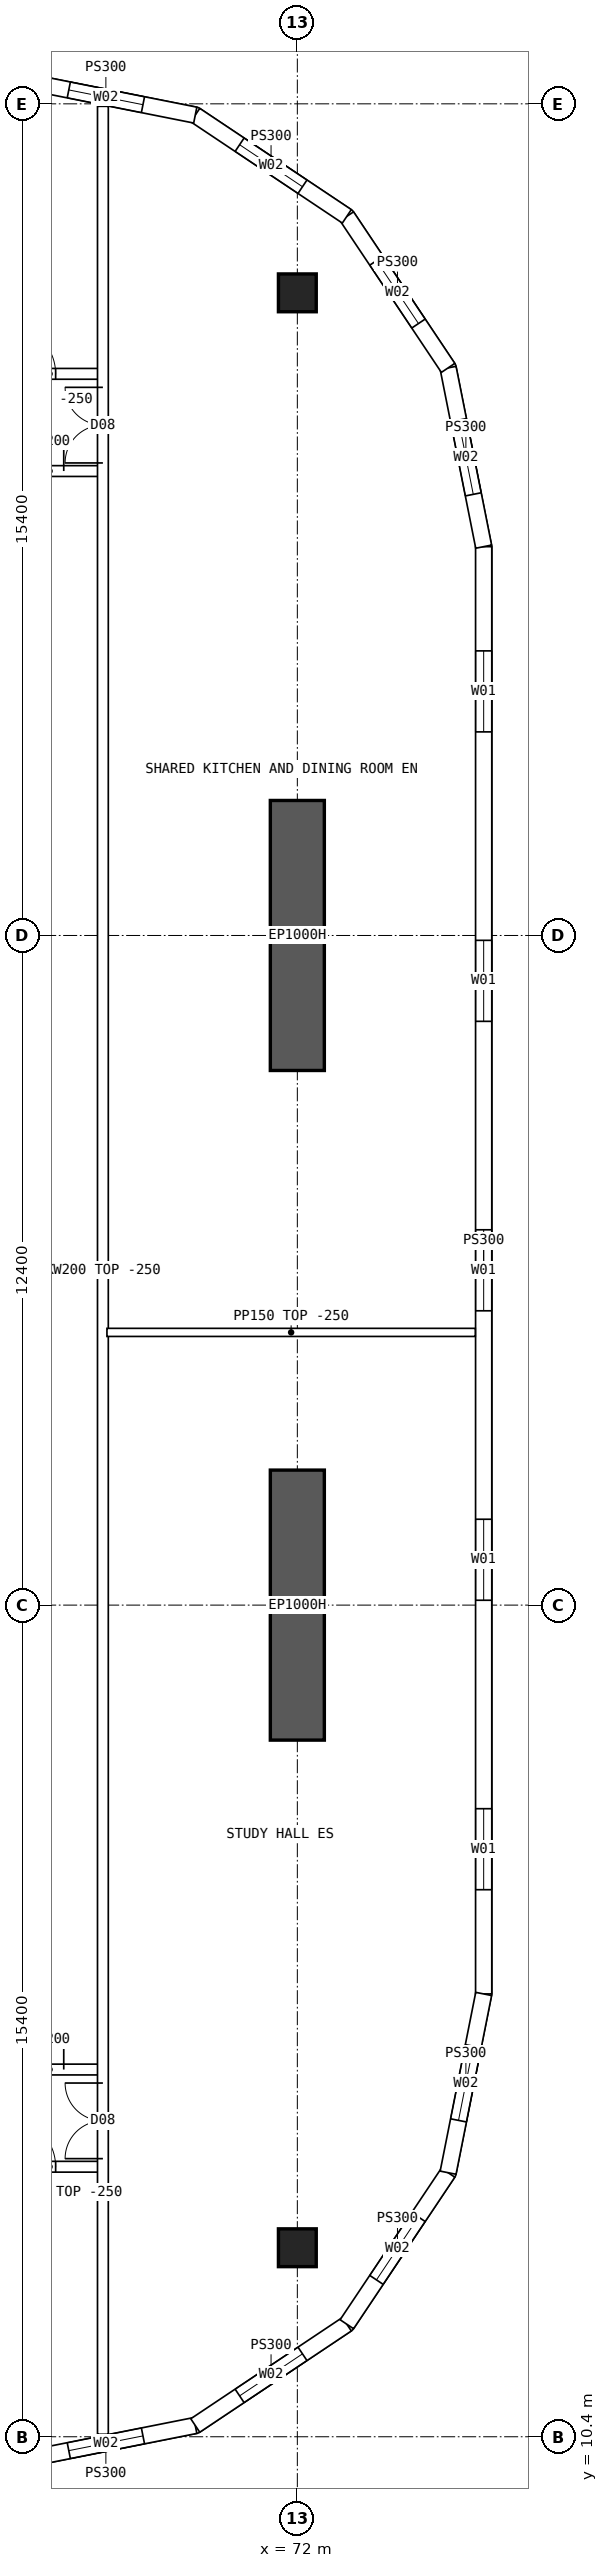
"""IFC4 building model, lengths in metres.
Left out: names, types, materials, properties, quantities, classifications, styles, units other than length and angle.
Written with IfcOpenShell. Run it as: python <this file> out.ifc"""

import sys

from ifc_helpers import new_model, si_unit, direction, frame, frame_2d, origin, origin_2d, place, context, subcontext, project, spatial, polyline, rectangle, hollow_rectangle, outline, extrude, element, fill, save


model = new_model("IFC4")
c1 = context("Model", 3, precision=1e-05, world=origin(), true_north=direction((0.0, 1.0)))
c2 = subcontext(c1, "Body", "Model", "MODEL_VIEW")
j1 = project(units=[si_unit("LENGTHUNIT", "METRE"), si_unit("PLANEANGLEUNIT", "RADIAN")], contexts=[c1])
p1 = place(None, origin())
s1 = spatial("IfcSite", under=j1, at=p1, CompositionType="ELEMENT")
p2 = place(p1, origin())
s2 = spatial("IfcBuilding", under=s1, at=p2, CompositionType="ELEMENT")
p3 = place(p2, frame((0.0, 0.0, 182.35)))
s3 = spatial("IfcBuildingStorey", under=s2, at=p3, CompositionType="ELEMENT", Elevation=182.35)
for number, where, z_axis, x_axis in (
    (1, (72.0, 13.9, 0.0), (0.0, 0.0, 1.0), (1.0, 0.0, 0.0)),
    (2, (72.0, 50.1, 0.0), (0.0, 0.0, 1.0), (1.0, 0.0, 0.0)),
):
    element("IfcColumn", number, at=place(p3, frame(where, z_axis=z_axis, x_axis=x_axis)), inside=s3, PredefinedType="COLUMN", context=c2, shape_type="SweptSolid", body=[
        extrude(hollow_rectangle(XDim=0.7, YDim=0.7, WallThickness=0.07, at=origin_2d()), origin(), (0.0, 0.0, 1.0), 3.75),
    ])
for number, where, z_axis, x_axis in (
    (3, (72.0, 23.3, 0.0), (0.0, 0.0, 1.0), (0.0, 1.0, 0.0)),
    (4, (72.0, 35.7, 0.0), (0.0, 0.0, 1.0), (0.0, 1.0, 0.0)),
):
    element("IfcWall", number, at=place(p3, frame(where, z_axis=z_axis, x_axis=x_axis)), inside=s3, PredefinedType="SHEAR", context=c2, shape_type="SweptSolid", body=[
        extrude(rectangle(XDim=5.0, YDim=1.0, at=frame_2d((2.5, 0.0))), origin(), (0.0, 0.0, 1.0), 3.75),
    ])
p4 = place(p3, frame((75.45, 18.6, 0.0), z_axis=(0.0, 0.0, 1.0), x_axis=(0.0, 1.0, 0.0)))
e5 = element("IfcWall", 5, at=p4, inside=s3, PredefinedType="SOLIDWALL", context=c2, shape_type="SweptSolid", body=[
    extrude(outline(polyline([(-0.015, -0.15), (26.815, -0.15), (26.785, 0.15), (0.015, 0.15), (-0.015, -0.15)])), origin(), (0.0, 0.0, 1.0), 3.5),
])
p5 = place(p4, frame((1.93, 0.0, 0.9)))
e6 = element("IfcOpeningElement", 6, at=p5, cuts=e5, PredefinedType="OPENING", context=c2, shape_type="SweptSolid", body=[
    extrude(rectangle(XDim=1.5, YDim=2.0, at=frame_2d((0.75, 1.0))), frame((0.0, 0.16, 0.0), z_axis=(0.0, -1.0, 0.0), x_axis=(1.0, 0.0, 0.0)), (0.0, 0.0, 1.0), 0.32),
])
p6 = place(p4, frame((7.29, 0.0, 0.9)))
e7 = element("IfcOpeningElement", 7, at=p6, cuts=e5, PredefinedType="OPENING", context=c2, shape_type="SweptSolid", body=[
    extrude(rectangle(XDim=1.5, YDim=2.0, at=frame_2d((0.75, 1.0))), frame((0.0, 0.16, 0.0), z_axis=(0.0, -1.0, 0.0), x_axis=(1.0, 0.0, 0.0)), (0.0, 0.0, 1.0), 0.32),
])
p7 = place(p4, frame((12.65, 0.0, 0.9)))
e8 = element("IfcOpeningElement", 8, at=p7, cuts=e5, PredefinedType="OPENING", context=c2, shape_type="SweptSolid", body=[
    extrude(rectangle(XDim=1.5, YDim=2.0, at=frame_2d((0.75, 1.0))), frame((0.0, 0.16, 0.0), z_axis=(0.0, -1.0, 0.0), x_axis=(1.0, 0.0, 0.0)), (0.0, 0.0, 1.0), 0.32),
])
p8 = place(p4, frame((18.01, 0.0, 0.9)))
e9 = element("IfcOpeningElement", 9, at=p8, cuts=e5, PredefinedType="OPENING", context=c2, shape_type="SweptSolid", body=[
    extrude(rectangle(XDim=1.5, YDim=2.0, at=frame_2d((0.75, 1.0))), frame((0.0, 0.16, 0.0), z_axis=(0.0, -1.0, 0.0), x_axis=(1.0, 0.0, 0.0)), (0.0, 0.0, 1.0), 0.32),
])
p9 = place(p4, frame((23.37, 0.0, 0.9)))
e10 = element("IfcOpeningElement", 10, at=p9, cuts=e5, PredefinedType="OPENING", context=c2, shape_type="SweptSolid", body=[
    extrude(rectangle(XDim=1.5, YDim=2.0, at=frame_2d((0.75, 1.0))), frame((0.0, 0.16, 0.0), z_axis=(0.0, -1.0, 0.0), x_axis=(1.0, 0.0, 0.0)), (0.0, 0.0, 1.0), 0.32),
])
p10 = place(p3, frame((66.8, 9.95, 0.0), z_axis=(0.0, 0.0, 1.0), x_axis=(0.98078325777, 0.195100490205, 0.0)))
e11 = element("IfcWall", 11, at=p10, inside=s3, PredefinedType="SOLIDWALL", context=c2, shape_type="SweptSolid", body=[
    extrude(outline(polyline([(-0.03, -0.15), (3.405, -0.15), (3.345, 0.15), (0.03, 0.15), (-0.03, -0.15)])), origin(), (0.0, 0.0, 1.0), 3.5),
])
p11 = place(p10, frame((0.988, 0.0, 0.9)))
e12 = element("IfcOpeningElement", 12, at=p11, cuts=e11, PredefinedType="OPENING", context=c2, shape_type="SweptSolid", body=[
    extrude(rectangle(XDim=1.4, YDim=1.8, at=frame_2d((0.7, 0.9))), frame((0.0, 0.16, 0.0), z_axis=(0.0, -1.0, 0.0), x_axis=(1.0, 0.0, 0.0)), (0.0, 0.0, 1.0), 0.32),
])
p12 = place(p3, frame((70.11, 10.608, 0.0), z_axis=(0.0, 0.0, 1.0), x_axis=(0.831493450887, 0.555534554399, 0.0)))
e13 = element("IfcWall", 13, at=p12, inside=s3, PredefinedType="SOLIDWALL", context=c2, shape_type="SweptSolid", body=[
    extrude(outline(polyline([(-0.03, -0.15), (3.405, -0.15), (3.345, 0.15), (0.03, 0.15), (-0.03, -0.15)])), origin(), (0.0, 0.0, 1.0), 3.5),
])
p13 = place(p12, frame((0.988, 0.0, 0.9)))
e14 = element("IfcOpeningElement", 14, at=p13, cuts=e13, PredefinedType="OPENING", context=c2, shape_type="SweptSolid", body=[
    extrude(rectangle(XDim=1.4, YDim=1.8, at=frame_2d((0.7, 0.9))), frame((0.0, 0.16, 0.0), z_axis=(0.0, -1.0, 0.0), x_axis=(1.0, 0.0, 0.0)), (0.0, 0.0, 1.0), 0.32),
])
p14 = place(p3, frame((72.917, 12.483, 0.0), z_axis=(0.0, 0.0, 1.0), x_axis=(0.555534554399, 0.831493450887, 0.0)))
e15 = element("IfcWall", 15, at=p14, inside=s3, PredefinedType="SOLIDWALL", context=c2, shape_type="SweptSolid", body=[
    extrude(outline(polyline([(-0.03, -0.15), (3.405, -0.15), (3.345, 0.15), (0.03, 0.15), (-0.03, -0.15)])), origin(), (0.0, 0.0, 1.0), 3.5),
])
p15 = place(p14, frame((0.988, 0.0, 0.9)))
e16 = element("IfcOpeningElement", 16, at=p15, cuts=e15, PredefinedType="OPENING", context=c2, shape_type="SweptSolid", body=[
    extrude(rectangle(XDim=1.4, YDim=1.8, at=frame_2d((0.7, 0.9))), frame((0.0, 0.16, 0.0), z_axis=(0.0, -1.0, 0.0), x_axis=(1.0, 0.0, 0.0)), (0.0, 0.0, 1.0), 0.32),
])
p16 = place(p3, frame((74.792, 15.29, 0.0), z_axis=(0.0, 0.0, 1.0), x_axis=(0.19508664885, 0.980786011034, 0.0)))
e17 = element("IfcWall", 17, at=p16, inside=s3, PredefinedType="SOLIDWALL", context=c2, shape_type="SweptSolid", body=[
    extrude(outline(polyline([(-0.03, -0.15), (3.39, -0.15), (3.36, 0.15), (0.03, 0.15), (-0.03, -0.15)])), origin(), (0.0, 0.0, 1.0), 3.5),
])
p17 = place(p16, frame((0.988, 0.0, 0.9)))
e18 = element("IfcOpeningElement", 18, at=p17, cuts=e17, PredefinedType="OPENING", context=c2, shape_type="SweptSolid", body=[
    extrude(rectangle(XDim=1.4, YDim=1.8, at=frame_2d((0.7, 0.9))), frame((0.0, 0.16, 0.0), z_axis=(0.0, -1.0, 0.0), x_axis=(1.0, 0.0, 0.0)), (0.0, 0.0, 1.0), 0.32),
])
p18 = place(p3, frame((75.45, 45.4, 0.0), z_axis=(0.0, 0.0, 1.0), x_axis=(-0.19508664885, 0.980786011034, 0.0)))
e19 = element("IfcWall", 19, at=p18, inside=s3, PredefinedType="SOLIDWALL", context=c2, shape_type="SweptSolid", body=[
    extrude(outline(polyline([(-0.015, -0.15), (3.405, -0.15), (3.345, 0.15), (0.015, 0.15), (-0.015, -0.15)])), origin(), (0.0, 0.0, 1.0), 3.5),
])
p19 = place(p18, frame((0.988, 0.0, 0.9)))
e20 = element("IfcOpeningElement", 20, at=p19, cuts=e19, PredefinedType="OPENING", context=c2, shape_type="SweptSolid", body=[
    extrude(rectangle(XDim=1.4, YDim=1.8, at=frame_2d((0.7, 0.9))), frame((0.0, 0.16, 0.0), z_axis=(0.0, -1.0, 0.0), x_axis=(1.0, 0.0, 0.0)), (0.0, 0.0, 1.0), 0.32),
])
p20 = place(p3, frame((74.792, 48.71, 0.0), z_axis=(0.0, 0.0, 1.0), x_axis=(-0.555534554399, 0.831493450887, 0.0)))
e21 = element("IfcWall", 21, at=p20, inside=s3, PredefinedType="SOLIDWALL", context=c2, shape_type="SweptSolid", body=[
    extrude(outline(polyline([(-0.03, -0.15), (3.405, -0.15), (3.345, 0.15), (0.03, 0.15), (-0.03, -0.15)])), origin(), (0.0, 0.0, 1.0), 3.5),
])
p21 = place(p20, frame((0.988, 0.0, 0.9)))
e22 = element("IfcOpeningElement", 22, at=p21, cuts=e21, PredefinedType="OPENING", context=c2, shape_type="SweptSolid", body=[
    extrude(rectangle(XDim=1.4, YDim=1.8, at=frame_2d((0.7, 0.9))), frame((0.0, 0.16, 0.0), z_axis=(0.0, -1.0, 0.0), x_axis=(1.0, 0.0, 0.0)), (0.0, 0.0, 1.0), 0.32),
])
p22 = place(p3, frame((72.917, 51.517, 0.0), z_axis=(0.0, 0.0, 1.0), x_axis=(-0.831493450887, 0.555534554399, 0.0)))
e23 = element("IfcWall", 23, at=p22, inside=s3, PredefinedType="SOLIDWALL", context=c2, shape_type="SweptSolid", body=[
    extrude(outline(polyline([(-0.03, -0.15), (3.405, -0.15), (3.345, 0.15), (0.03, 0.15), (-0.03, -0.15)])), origin(), (0.0, 0.0, 1.0), 3.5),
])
p23 = place(p22, frame((0.988, 0.0, 0.9)))
e24 = element("IfcOpeningElement", 24, at=p23, cuts=e23, PredefinedType="OPENING", context=c2, shape_type="SweptSolid", body=[
    extrude(rectangle(XDim=1.4, YDim=1.8, at=frame_2d((0.7, 0.9))), frame((0.0, 0.16, 0.0), z_axis=(0.0, -1.0, 0.0), x_axis=(1.0, 0.0, 0.0)), (0.0, 0.0, 1.0), 0.32),
])
p24 = place(p3, frame((70.11, 53.392, 0.0), z_axis=(0.0, 0.0, 1.0), x_axis=(-0.98078325777, 0.195100490205, 0.0)))
e25 = element("IfcWall", 25, at=p24, inside=s3, PredefinedType="SOLIDWALL", context=c2, shape_type="SweptSolid", body=[
    extrude(outline(polyline([(-0.03, -0.15), (3.405, -0.15), (3.345, 0.15), (0.03, 0.15), (-0.03, -0.15)])), origin(), (0.0, 0.0, 1.0), 3.5),
])
p25 = place(p24, frame((0.988, 0.0, 0.9)))
e26 = element("IfcOpeningElement", 26, at=p25, cuts=e25, PredefinedType="OPENING", context=c2, shape_type="SweptSolid", body=[
    extrude(rectangle(XDim=1.4, YDim=1.8, at=frame_2d((0.7, 0.9))), frame((0.0, 0.16, 0.0), z_axis=(0.0, -1.0, 0.0), x_axis=(1.0, 0.0, 0.0)), (0.0, 0.0, 1.0), 0.32),
])
p26 = place(p3, frame((66.425, 15.4, 0.0), z_axis=(0.0, 0.0, 1.0), x_axis=(1.0, 0.0, 0.0)))
e27 = element("IfcWall", 27, at=p26, inside=s3, PredefinedType="SOLIDWALL", context=c2, shape_type="SweptSolid", body=[
    extrude(rectangle(XDim=1.975, YDim=0.2, at=frame_2d((0.987, 0.0))), origin(), (0.0, 0.0, 1.0), 3.5),
])
p27 = place(p26, frame((0.2, 0.0, 0.0)))
e28 = element("IfcOpeningElement", 28, at=p27, cuts=e27, PredefinedType="OPENING", context=c2, shape_type="SweptSolid", body=[
    extrude(rectangle(XDim=0.9, YDim=2.1, at=frame_2d((0.45, 1.05))), frame((0.0, 0.11, 0.0), z_axis=(0.0, -1.0, 0.0), x_axis=(1.0, 0.0, 0.0)), (0.0, 0.0, 1.0), 0.22),
])
p28 = place(p3, frame((66.425, 17.2, 0.0), z_axis=(0.0, 0.0, 1.0), x_axis=(1.0, 0.0, 0.0)))
e29 = element("IfcWall", 29, at=p28, inside=s3, PredefinedType="SOLIDWALL", context=c2, shape_type="SweptSolid", body=[
    extrude(rectangle(XDim=1.975, YDim=0.2, at=frame_2d((0.987, 0.0))), origin(), (0.0, 0.0, 1.0), 3.5),
])
p29 = place(p28, frame((0.05, 0.0, 0.0)))
e30 = element("IfcOpeningElement", 30, at=p29, cuts=e29, PredefinedType="OPENING", context=c2, shape_type="SweptSolid", body=[
    extrude(rectangle(XDim=1.2, YDim=2.1, at=frame_2d((0.6, 1.05))), frame((0.0, 0.11, 0.0), z_axis=(0.0, -1.0, 0.0), x_axis=(1.0, 0.0, 0.0)), (0.0, 0.0, 1.0), 0.22),
])
p30 = place(p3, frame((66.425, 48.6, 0.0), z_axis=(0.0, 0.0, 1.0), x_axis=(1.0, 0.0, 0.0)))
e31 = element("IfcWall", 31, at=p30, inside=s3, PredefinedType="SOLIDWALL", context=c2, shape_type="SweptSolid", body=[
    extrude(rectangle(XDim=1.975, YDim=0.2, at=frame_2d((0.987, 0.0))), origin(), (0.0, 0.0, 1.0), 3.5),
])
p31 = place(p30, frame((0.2, 0.0, 0.0)))
e32 = element("IfcOpeningElement", 32, at=p31, cuts=e31, PredefinedType="OPENING", context=c2, shape_type="SweptSolid", body=[
    extrude(rectangle(XDim=0.9, YDim=2.1, at=frame_2d((0.45, 1.05))), frame((0.0, 0.11, 0.0), z_axis=(0.0, -1.0, 0.0), x_axis=(1.0, 0.0, 0.0)), (0.0, 0.0, 1.0), 0.22),
])
p32 = place(p3, frame((66.425, 46.8, 0.0), z_axis=(0.0, 0.0, 1.0), x_axis=(1.0, 0.0, 0.0)))
e33 = element("IfcWall", 33, at=p32, inside=s3, PredefinedType="SOLIDWALL", context=c2, shape_type="SweptSolid", body=[
    extrude(rectangle(XDim=1.975, YDim=0.2, at=frame_2d((0.987, 0.0))), origin(), (0.0, 0.0, 1.0), 3.5),
])
p33 = place(p32, frame((0.05, 0.0, 0.0)))
e34 = element("IfcOpeningElement", 34, at=p33, cuts=e33, PredefinedType="OPENING", context=c2, shape_type="SweptSolid", body=[
    extrude(rectangle(XDim=1.2, YDim=2.1, at=frame_2d((0.6, 1.05))), frame((0.0, 0.11, 0.0), z_axis=(0.0, -1.0, 0.0), x_axis=(1.0, 0.0, 0.0)), (0.0, 0.0, 1.0), 0.22),
])
p34 = place(p3, frame((68.475, 30.85, 0.0), z_axis=(0.0, 0.0, 1.0), x_axis=(1.0, 0.0, 0.0)))
e35 = element("IfcWall", 35, at=p34, inside=s3, PredefinedType="PARTITIONING", context=c2, shape_type="SweptSolid", body=[
    extrude(outline(polyline([(0.0, 0.0), (6.82, 0.0), (6.82, 3.5), (3.827, 3.5), (3.825, 3.05), (3.227, 3.05), (3.225, 3.5), (0.0, 3.5), (0.0, 0.0)])), frame((0.0, 0.075, 0.0), z_axis=(0.0, -1.0, 0.0), x_axis=(1.0, 0.0, 0.0)), (0.0, 0.0, 1.0), 0.15),
])
p35 = place(p3, frame((68.4, 10.446, 0.0), z_axis=(0.0, 0.0, 1.0), x_axis=(0.0, 1.0, 0.0)))
e36 = element("IfcWall", 36, at=p35, inside=s3, PredefinedType="SOLIDWALL", context=c2, shape_type="SweptSolid", body=[
    extrude(rectangle(XDim=43.107, YDim=0.2, at=frame_2d((21.554, 0.0))), origin(), (0.0, 0.0, 1.0), 3.5),
])
p36 = place(p35, frame((5.104, 0.0, 0.0)))
e37 = element("IfcOpeningElement", 37, at=p36, cuts=e36, PredefinedType="OPENING", context=c2, shape_type="SweptSolid", body=[
    extrude(rectangle(XDim=1.4, YDim=2.1, at=frame_2d((0.7, 1.05))), frame((0.0, 0.11, 0.0), z_axis=(0.0, -1.0, 0.0), x_axis=(1.0, 0.0, 0.0)), (0.0, 0.0, 1.0), 0.22),
])
p37 = place(p35, frame((36.504, 0.0, 0.0)))
e38 = element("IfcOpeningElement", 38, at=p37, cuts=e36, PredefinedType="OPENING", context=c2, shape_type="SweptSolid", body=[
    extrude(rectangle(XDim=1.4, YDim=2.1, at=frame_2d((0.7, 1.05))), frame((0.0, 0.11, 0.0), z_axis=(0.0, -1.0, 0.0), x_axis=(1.0, 0.0, 0.0)), (0.0, 0.0, 1.0), 0.22),
])
p38 = place(p5, origin())
e39 = element("IfcWindow", 39, at=p38, inside=s3, PartitioningType="SINGLE_PANEL", PredefinedType="WINDOW", context=c2, shape_type="SweptSolid", body=[
    extrude(rectangle(XDim=1.5, YDim=2.0, at=frame_2d((0.75, 1.0))), frame((0.0, 0.03, 0.0), z_axis=(0.0, -1.0, 0.0), x_axis=(1.0, 0.0, 0.0)), (0.0, 0.0, 1.0), 0.06),
])
fill(e6, e39)
p39 = place(p6, origin())
e40 = element("IfcWindow", 40, at=p39, inside=s3, PartitioningType="SINGLE_PANEL", PredefinedType="WINDOW", context=c2, shape_type="SweptSolid", body=[
    extrude(rectangle(XDim=1.5, YDim=2.0, at=frame_2d((0.75, 1.0))), frame((0.0, 0.03, 0.0), z_axis=(0.0, -1.0, 0.0), x_axis=(1.0, 0.0, 0.0)), (0.0, 0.0, 1.0), 0.06),
])
fill(e7, e40)
p40 = place(p7, origin())
e41 = element("IfcWindow", 41, at=p40, inside=s3, PartitioningType="SINGLE_PANEL", PredefinedType="WINDOW", context=c2, shape_type="SweptSolid", body=[
    extrude(rectangle(XDim=1.5, YDim=2.0, at=frame_2d((0.75, 1.0))), frame((0.0, 0.03, 0.0), z_axis=(0.0, -1.0, 0.0), x_axis=(1.0, 0.0, 0.0)), (0.0, 0.0, 1.0), 0.06),
])
fill(e8, e41)
p41 = place(p8, origin())
e42 = element("IfcWindow", 42, at=p41, inside=s3, PartitioningType="SINGLE_PANEL", PredefinedType="WINDOW", context=c2, shape_type="SweptSolid", body=[
    extrude(rectangle(XDim=1.5, YDim=2.0, at=frame_2d((0.75, 1.0))), frame((0.0, 0.03, 0.0), z_axis=(0.0, -1.0, 0.0), x_axis=(1.0, 0.0, 0.0)), (0.0, 0.0, 1.0), 0.06),
])
fill(e9, e42)
p42 = place(p9, origin())
e43 = element("IfcWindow", 43, at=p42, inside=s3, PartitioningType="SINGLE_PANEL", PredefinedType="WINDOW", context=c2, shape_type="SweptSolid", body=[
    extrude(rectangle(XDim=1.5, YDim=2.0, at=frame_2d((0.75, 1.0))), frame((0.0, 0.03, 0.0), z_axis=(0.0, -1.0, 0.0), x_axis=(1.0, 0.0, 0.0)), (0.0, 0.0, 1.0), 0.06),
])
fill(e10, e43)
p43 = place(p11, origin())
e44 = element("IfcWindow", 44, at=p43, inside=s3, PartitioningType="SINGLE_PANEL", PredefinedType="WINDOW", context=c2, shape_type="SweptSolid", body=[
    extrude(rectangle(XDim=1.4, YDim=1.8, at=frame_2d((0.7, 0.9))), frame((0.0, 0.03, 0.0), z_axis=(0.0, -1.0, 0.0), x_axis=(1.0, 0.0, 0.0)), (0.0, 0.0, 1.0), 0.06),
])
fill(e12, e44)
p44 = place(p13, origin())
e45 = element("IfcWindow", 45, at=p44, inside=s3, PartitioningType="SINGLE_PANEL", PredefinedType="WINDOW", context=c2, shape_type="SweptSolid", body=[
    extrude(rectangle(XDim=1.4, YDim=1.8, at=frame_2d((0.7, 0.9))), frame((0.0, 0.03, 0.0), z_axis=(0.0, -1.0, 0.0), x_axis=(1.0, 0.0, 0.0)), (0.0, 0.0, 1.0), 0.06),
])
fill(e14, e45)
p45 = place(p15, origin())
e46 = element("IfcWindow", 46, at=p45, inside=s3, PartitioningType="SINGLE_PANEL", PredefinedType="WINDOW", context=c2, shape_type="SweptSolid", body=[
    extrude(rectangle(XDim=1.4, YDim=1.8, at=frame_2d((0.7, 0.9))), frame((0.0, 0.03, 0.0), z_axis=(0.0, -1.0, 0.0), x_axis=(1.0, 0.0, 0.0)), (0.0, 0.0, 1.0), 0.06),
])
fill(e16, e46)
p46 = place(p17, origin())
e47 = element("IfcWindow", 47, at=p46, inside=s3, PartitioningType="SINGLE_PANEL", PredefinedType="WINDOW", context=c2, shape_type="SweptSolid", body=[
    extrude(rectangle(XDim=1.4, YDim=1.8, at=frame_2d((0.7, 0.9))), frame((0.0, 0.03, 0.0), z_axis=(0.0, -1.0, 0.0), x_axis=(1.0, 0.0, 0.0)), (0.0, 0.0, 1.0), 0.06),
])
fill(e18, e47)
p47 = place(p19, origin())
e48 = element("IfcWindow", 48, at=p47, inside=s3, PartitioningType="SINGLE_PANEL", PredefinedType="WINDOW", context=c2, shape_type="SweptSolid", body=[
    extrude(rectangle(XDim=1.4, YDim=1.8, at=frame_2d((0.7, 0.9))), frame((0.0, 0.03, 0.0), z_axis=(0.0, -1.0, 0.0), x_axis=(1.0, 0.0, 0.0)), (0.0, 0.0, 1.0), 0.06),
])
fill(e20, e48)
p48 = place(p21, origin())
e49 = element("IfcWindow", 49, at=p48, inside=s3, PartitioningType="SINGLE_PANEL", PredefinedType="WINDOW", context=c2, shape_type="SweptSolid", body=[
    extrude(rectangle(XDim=1.4, YDim=1.8, at=frame_2d((0.7, 0.9))), frame((0.0, 0.03, 0.0), z_axis=(0.0, -1.0, 0.0), x_axis=(1.0, 0.0, 0.0)), (0.0, 0.0, 1.0), 0.06),
])
fill(e22, e49)
p49 = place(p23, origin())
e50 = element("IfcWindow", 50, at=p49, inside=s3, PartitioningType="SINGLE_PANEL", PredefinedType="WINDOW", context=c2, shape_type="SweptSolid", body=[
    extrude(rectangle(XDim=1.4, YDim=1.8, at=frame_2d((0.7, 0.9))), frame((0.0, 0.03, 0.0), z_axis=(0.0, -1.0, 0.0), x_axis=(1.0, 0.0, 0.0)), (0.0, 0.0, 1.0), 0.06),
])
fill(e24, e50)
p50 = place(p25, origin())
e51 = element("IfcWindow", 51, at=p50, inside=s3, PartitioningType="SINGLE_PANEL", PredefinedType="WINDOW", context=c2, shape_type="SweptSolid", body=[
    extrude(rectangle(XDim=1.4, YDim=1.8, at=frame_2d((0.7, 0.9))), frame((0.0, 0.03, 0.0), z_axis=(0.0, -1.0, 0.0), x_axis=(1.0, 0.0, 0.0)), (0.0, 0.0, 1.0), 0.06),
])
fill(e26, e51)
p51 = place(p29, origin())
e52 = element("IfcDoor", 52, at=p51, inside=s3, OperationType="DOUBLE_DOOR_SINGLE_SWING", PredefinedType="DOOR", context=c2, shape_type="SweptSolid", body=[
    extrude(rectangle(XDim=1.2, YDim=2.1, at=frame_2d((0.6, 1.05))), frame((0.0, 0.025, 0.0), z_axis=(0.0, -1.0, 0.0), x_axis=(1.0, 0.0, 0.0)), (0.0, 0.0, 1.0), 0.05),
])
fill(e30, e52)
p52 = place(p33, origin())
e53 = element("IfcDoor", 53, at=p52, inside=s3, OperationType="DOUBLE_DOOR_SINGLE_SWING", PredefinedType="DOOR", context=c2, shape_type="SweptSolid", body=[
    extrude(rectangle(XDim=1.2, YDim=2.1, at=frame_2d((0.6, 1.05))), frame((0.0, 0.025, 0.0), z_axis=(0.0, -1.0, 0.0), x_axis=(1.0, 0.0, 0.0)), (0.0, 0.0, 1.0), 0.05),
])
fill(e34, e53)
p53 = place(p36, origin())
e54 = element("IfcDoor", 54, at=p53, inside=s3, OperationType="DOUBLE_DOOR_SINGLE_SWING", PredefinedType="DOOR", context=c2, shape_type="SweptSolid", body=[
    extrude(rectangle(XDim=1.4, YDim=2.1, at=frame_2d((0.7, 1.05))), frame((0.0, 0.025, 0.0), z_axis=(0.0, -1.0, 0.0), x_axis=(1.0, 0.0, 0.0)), (0.0, 0.0, 1.0), 0.05),
])
fill(e37, e54)
p54 = place(p37, origin())
e55 = element("IfcDoor", 55, at=p54, inside=s3, OperationType="DOUBLE_DOOR_SINGLE_SWING", PredefinedType="DOOR", context=c2, shape_type="SweptSolid", body=[
    extrude(rectangle(XDim=1.4, YDim=2.1, at=frame_2d((0.7, 1.05))), frame((0.0, 0.025, 0.0), z_axis=(0.0, -1.0, 0.0), x_axis=(1.0, 0.0, 0.0)), (0.0, 0.0, 1.0), 0.05),
])
fill(e38, e55)
p55 = place(p27, origin())
e56 = element("IfcDoor", 56, at=p55, inside=s3, OperationType="SINGLE_SWING_LEFT", PredefinedType="DOOR", context=c2, shape_type="SweptSolid", body=[
    extrude(rectangle(XDim=0.9, YDim=2.1, at=frame_2d((0.45, 1.05))), frame((0.0, 0.025, 0.0), z_axis=(0.0, -1.0, 0.0), x_axis=(1.0, 0.0, 0.0)), (0.0, 0.0, 1.0), 0.05),
])
fill(e28, e56)
p56 = place(p31, origin())
e57 = element("IfcDoor", 57, at=p56, inside=s3, OperationType="SINGLE_SWING_LEFT", PredefinedType="DOOR", context=c2, shape_type="SweptSolid", body=[
    extrude(rectangle(XDim=0.9, YDim=2.1, at=frame_2d((0.45, 1.05))), frame((0.0, 0.025, 0.0), z_axis=(0.0, -1.0, 0.0), x_axis=(1.0, 0.0, 0.0)), (0.0, 0.0, 1.0), 0.05),
])
fill(e32, e57)
save(model, sys.argv[1])
